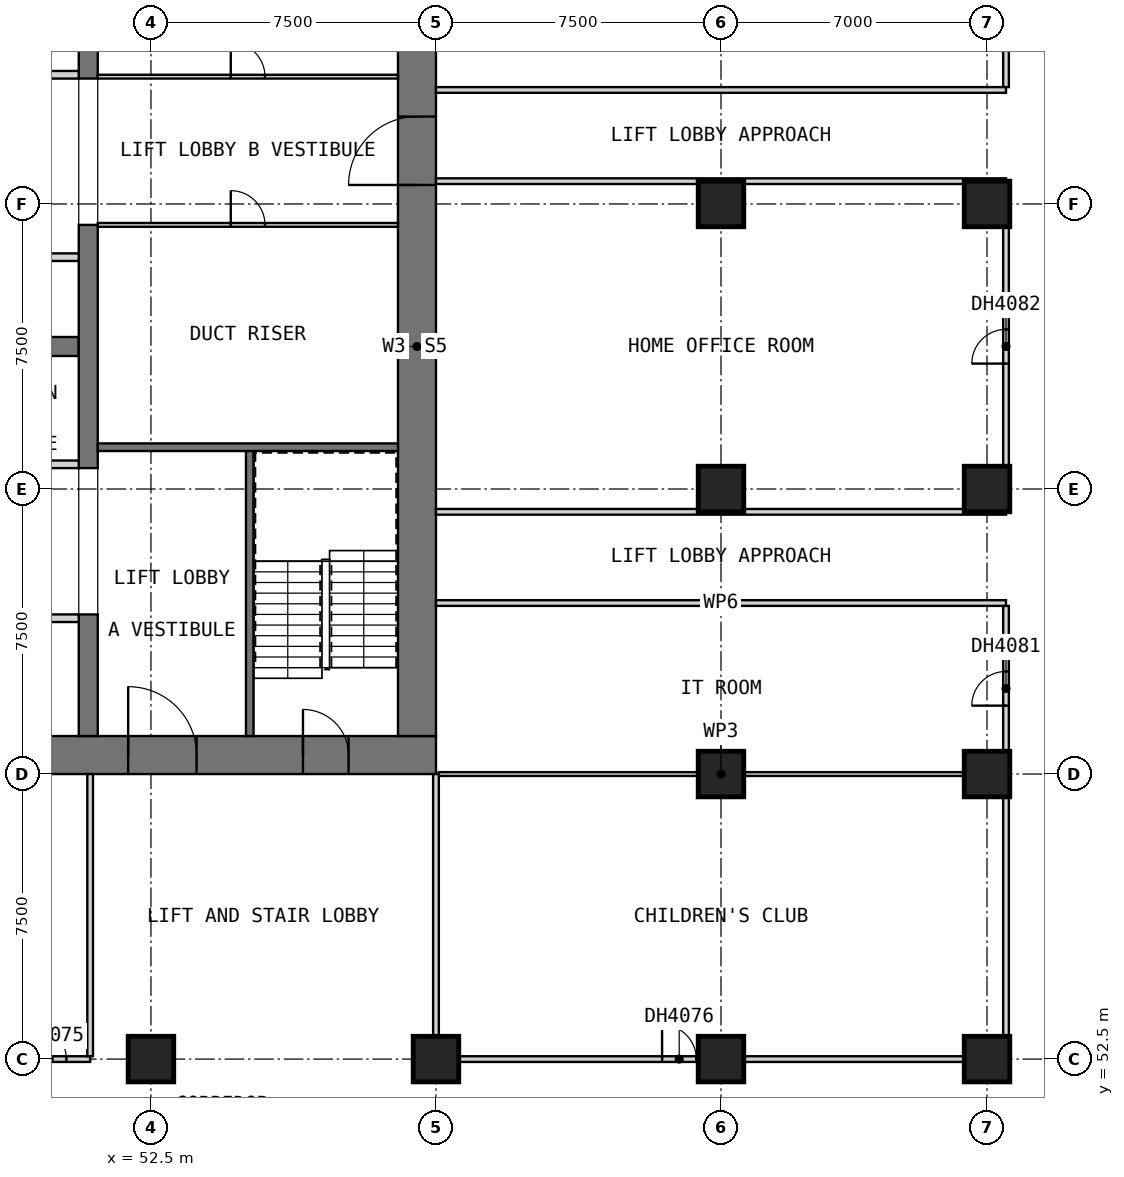
"""IFC4 building model, lengths in metres.
Left out: names, types, materials, properties, quantities, classifications, styles, units other than length and angle.
Written with IfcOpenShell. Run it as: python <this file> out.ifc"""

import sys

from ifc_helpers import new_model, si_unit, direction, frame, frame_2d, origin, origin_2d, place, context, subcontext, project, spatial, rectangle, extrude, element, fill, save


model = new_model("IFC4")
c1 = context("Model", 3, precision=1e-05, world=origin(), true_north=direction((0.0, 1.0)))
c2 = subcontext(c1, "Body", "Model", "MODEL_VIEW")
j1 = project(units=[si_unit("LENGTHUNIT", "METRE"), si_unit("PLANEANGLEUNIT", "RADIAN")], contexts=[c1])
p1 = place(None, origin())
s1 = spatial("IfcSite", under=j1, at=p1, CompositionType="ELEMENT")
p2 = place(p1, origin())
s2 = spatial("IfcBuilding", under=s1, at=p2, CompositionType="ELEMENT")
p3 = place(p2, frame((0.0, 0.0, 44.8)))
s3 = spatial("IfcBuildingStorey", under=s2, at=p3, CompositionType="ELEMENT", Elevation=44.8)
for number, where, z_axis, x_axis in (
    (1, (52.5, 52.5, 0.0), (0.0, 0.0, 1.0), (1.0, 0.0, 0.0)),
    (2, (60.0, 52.5, 0.0), (0.0, 0.0, 1.0), (1.0, 0.0, 0.0)),
    (3, (67.5, 52.5, 0.0), (0.0, 0.0, 1.0), (1.0, 0.0, 0.0)),
    (4, (67.5, 60.0, 0.0), (0.0, 0.0, 1.0), (1.0, 0.0, 0.0)),
    (5, (67.5, 67.5, 0.0), (0.0, 0.0, 1.0), (1.0, 0.0, 0.0)),
    (6, (67.5, 75.0, 0.0), (0.0, 0.0, 1.0), (1.0, 0.0, 0.0)),
    (7, (74.5, 52.5, 0.0), (0.0, 0.0, 1.0), (1.0, 0.0, 0.0)),
    (8, (74.5, 60.0, 0.0), (0.0, 0.0, 1.0), (1.0, 0.0, 0.0)),
    (9, (74.5, 67.5, 0.0), (0.0, 0.0, 1.0), (1.0, 0.0, 0.0)),
    (10, (74.5, 75.0, 0.0), (0.0, 0.0, 1.0), (1.0, 0.0, 0.0)),
):
    element("IfcColumn", number, at=place(p3, frame(where, z_axis=z_axis, x_axis=x_axis)), inside=s3, PredefinedType="COLUMN", context=c2, shape_type="SweptSolid", body=[
        extrude(rectangle(XDim=1.2, YDim=1.2, at=origin_2d()), origin(), (0.0, 0.0, 1.0), 3.6),
    ])
p4 = place(p3, frame((30.0, 60.5, 0.0), z_axis=(0.0, 0.0, 1.0), x_axis=(1.0, 0.0, 0.0)))
e11 = element("IfcWall", 11, at=p4, inside=s3, PredefinedType="SHEAR", context=c2, shape_type="SweptSolid", body=[
    extrude(rectangle(XDim=30.0, YDim=1.0, at=frame_2d((15.0, 0.0))), origin(), (0.0, 0.0, 1.0), 3.6),
])
p5 = place(p4, frame((21.9, 0.0, 0.0)))
e12 = element("IfcOpeningElement", 12, at=p5, cuts=e11, PredefinedType="OPENING", context=c2, shape_type="SweptSolid", body=[
    extrude(rectangle(XDim=1.8, YDim=2.1, at=frame_2d((0.9, 1.05))), frame((0.0, 0.51, 0.0), z_axis=(0.0, -1.0, 0.0), x_axis=(1.0, 0.0, 0.0)), (0.0, 0.0, 1.0), 1.02),
])
p6 = place(p4, frame((26.5, 0.0, 0.0)))
e13 = element("IfcOpeningElement", 13, at=p6, cuts=e11, PredefinedType="OPENING", context=c2, shape_type="SweptSolid", body=[
    extrude(rectangle(XDim=1.2, YDim=2.1, at=frame_2d((0.6, 1.05))), frame((0.0, 0.51, 0.0), z_axis=(0.0, -1.0, 0.0), x_axis=(1.0, 0.0, 0.0)), (0.0, 0.0, 1.0), 1.02),
])
p7 = place(p3, frame((59.5, 61.0, 0.0), z_axis=(0.0, 0.0, 1.0), x_axis=(0.0, 1.0, 0.0)))
e14 = element("IfcWall", 14, at=p7, inside=s3, PredefinedType="SHEAR", context=c2, shape_type="SweptSolid", body=[
    extrude(rectangle(XDim=20.5, YDim=1.0, at=frame_2d((10.25, 0.0))), origin(), (0.0, 0.0, 1.0), 3.6),
])
p8 = place(p7, frame((14.5, 0.0, 0.0)))
e15 = element("IfcOpeningElement", 15, at=p8, cuts=e14, PredefinedType="OPENING", context=c2, shape_type="SweptSolid", body=[
    extrude(rectangle(XDim=1.8, YDim=2.1, at=frame_2d((0.9, 1.05))), frame((0.0, 0.51, 0.0), z_axis=(0.0, -1.0, 0.0), x_axis=(1.0, 0.0, 0.0)), (0.0, 0.0, 1.0), 1.02),
])
p9 = place(p3, frame((35.0, 71.25, 0.0), z_axis=(0.0, 0.0, 1.0), x_axis=(1.0, 0.0, 0.0)))
e16 = element("IfcWall", 16, at=p9, inside=s3, PredefinedType="SHEAR", context=c2, shape_type="SweptSolid", body=[
    extrude(rectangle(XDim=15.6, YDim=0.5, at=frame_2d((7.8, 0.0))), origin(), (0.0, 0.0, 1.0), 3.6),
])
p10 = place(p3, frame((50.85, 61.0, 0.0), z_axis=(0.0, 0.0, 1.0), x_axis=(0.0, 1.0, 0.0)))
e17 = element("IfcWall", 17, at=p10, inside=s3, PredefinedType="SHEAR", context=c2, shape_type="SweptSolid", body=[
    extrude(rectangle(XDim=3.2, YDim=0.5, at=frame_2d((1.6, 0.0))), origin(), (0.0, 0.0, 1.0), 3.6),
])
p11 = place(p3, frame((50.85, 68.05, 0.0), z_axis=(0.0, 0.0, 1.0), x_axis=(0.0, 1.0, 0.0)))
e18 = element("IfcWall", 18, at=p11, inside=s3, PredefinedType="SHEAR", context=c2, shape_type="SweptSolid", body=[
    extrude(rectangle(XDim=6.4, YDim=0.5, at=frame_2d((3.2, 0.0))), origin(), (0.0, 0.0, 1.0), 3.6),
])
p12 = place(p3, frame((50.85, 78.3, 0.0), z_axis=(0.0, 0.0, 1.0), x_axis=(0.0, 1.0, 0.0)))
e19 = element("IfcWall", 19, at=p12, inside=s3, PredefinedType="SHEAR", context=c2, shape_type="SweptSolid", body=[
    extrude(rectangle(XDim=3.2, YDim=0.5, at=frame_2d((1.6, 0.0))), origin(), (0.0, 0.0, 1.0), 3.6),
])
p13 = place(p3, frame((48.0, 64.1, 0.0), z_axis=(0.0, 0.0, 1.0), x_axis=(1.0, 0.0, 0.0)))
e20 = element("IfcWall", 20, at=p13, inside=s3, PredefinedType="PARTITIONING", context=c2, shape_type="SweptSolid", body=[
    extrude(rectangle(XDim=2.6, YDim=0.2, at=frame_2d((1.3, 0.0))), origin(), (0.0, 0.0, 1.0), 3.35),
])
p14 = place(p13, frame((0.85, 0.0, 0.0)))
e21 = element("IfcOpeningElement", 21, at=p14, cuts=e20, PredefinedType="OPENING", context=c2, shape_type="SweptSolid", body=[
    extrude(rectangle(XDim=0.9, YDim=2.1, at=frame_2d((0.45, 1.05))), frame((0.0, 0.11, 0.0), z_axis=(0.0, -1.0, 0.0), x_axis=(1.0, 0.0, 0.0)), (0.0, 0.0, 1.0), 0.22),
])
p15 = place(p3, frame((48.0, 68.15, 0.0), z_axis=(0.0, 0.0, 1.0), x_axis=(1.0, 0.0, 0.0)))
e22 = element("IfcWall", 22, at=p15, inside=s3, PredefinedType="PARTITIONING", context=c2, shape_type="SweptSolid", body=[
    extrude(rectangle(XDim=2.6, YDim=0.2, at=frame_2d((1.3, 0.0))), origin(), (0.0, 0.0, 1.0), 3.35),
])
p16 = place(p15, frame((0.85, 0.0, 0.0)))
e23 = element("IfcOpeningElement", 23, at=p16, cuts=e22, PredefinedType="OPENING", context=c2, shape_type="SweptSolid", body=[
    extrude(rectangle(XDim=0.9, YDim=2.1, at=frame_2d((0.45, 1.05))), frame((0.0, 0.11, 0.0), z_axis=(0.0, -1.0, 0.0), x_axis=(1.0, 0.0, 0.0)), (0.0, 0.0, 1.0), 0.22),
])
p17 = place(p3, frame((35.0, 73.6, 0.0), z_axis=(0.0, 0.0, 1.0), x_axis=(1.0, 0.0, 0.0)))
e24 = element("IfcWall", 24, at=p17, inside=s3, PredefinedType="PARTITIONING", context=c2, shape_type="SweptSolid", body=[
    extrude(rectangle(XDim=15.6, YDim=0.2, at=frame_2d((7.8, 0.0))), origin(), (0.0, 0.0, 1.0), 3.35),
])
p18 = place(p17, frame((3.55, 0.0, 0.0)))
e25 = element("IfcOpeningElement", 25, at=p18, cuts=e24, PredefinedType="OPENING", context=c2, shape_type="SweptSolid", body=[
    extrude(rectangle(XDim=0.9, YDim=2.1, at=frame_2d((0.45, 1.05))), frame((0.0, 0.11, 0.0), z_axis=(0.0, -1.0, 0.0), x_axis=(1.0, 0.0, 0.0)), (0.0, 0.0, 1.0), 0.22),
])
p19 = place(p17, frame((11.35, 0.0, 0.0)))
e26 = element("IfcOpeningElement", 26, at=p19, cuts=e24, PredefinedType="OPENING", context=c2, shape_type="SweptSolid", body=[
    extrude(rectangle(XDim=0.9, YDim=2.1, at=frame_2d((0.45, 1.05))), frame((0.0, 0.11, 0.0), z_axis=(0.0, -1.0, 0.0), x_axis=(1.0, 0.0, 0.0)), (0.0, 0.0, 1.0), 0.22),
])
p20 = place(p3, frame((35.0, 78.4, 0.0), z_axis=(0.0, 0.0, 1.0), x_axis=(1.0, 0.0, 0.0)))
e27 = element("IfcWall", 27, at=p20, inside=s3, PredefinedType="SOLIDWALL", context=c2, shape_type="SweptSolid", body=[
    extrude(rectangle(XDim=15.6, YDim=0.2, at=frame_2d((7.8, 0.0))), origin(), (0.0, 0.0, 1.0), 3.6),
])
p21 = place(p20, frame((0.75, 0.0, 0.0)))
e28 = element("IfcOpeningElement", 28, at=p21, cuts=e27, PredefinedType="OPENING", context=c2, shape_type="SweptSolid", body=[
    extrude(rectangle(XDim=1.1, YDim=2.1, at=frame_2d((0.55, 1.05))), frame((0.0, 0.11, 0.0), z_axis=(0.0, -1.0, 0.0), x_axis=(1.0, 0.0, 0.0)), (0.0, 0.0, 1.0), 0.22),
])
p22 = place(p20, frame((3.35, 0.0, 0.0)))
e29 = element("IfcOpeningElement", 29, at=p22, cuts=e27, PredefinedType="OPENING", context=c2, shape_type="SweptSolid", body=[
    extrude(rectangle(XDim=1.1, YDim=2.1, at=frame_2d((0.55, 1.05))), frame((0.0, 0.11, 0.0), z_axis=(0.0, -1.0, 0.0), x_axis=(1.0, 0.0, 0.0)), (0.0, 0.0, 1.0), 0.22),
])
p23 = place(p20, frame((11.15, 0.0, 0.0)))
e30 = element("IfcOpeningElement", 30, at=p23, cuts=e27, PredefinedType="OPENING", context=c2, shape_type="SweptSolid", body=[
    extrude(rectangle(XDim=1.1, YDim=2.1, at=frame_2d((0.55, 1.05))), frame((0.0, 0.11, 0.0), z_axis=(0.0, -1.0, 0.0), x_axis=(1.0, 0.0, 0.0)), (0.0, 0.0, 1.0), 0.22),
])
p24 = place(p20, frame((13.75, 0.0, 0.0)))
e31 = element("IfcOpeningElement", 31, at=p24, cuts=e27, PredefinedType="OPENING", context=c2, shape_type="SweptSolid", body=[
    extrude(rectangle(XDim=1.1, YDim=2.1, at=frame_2d((0.55, 1.05))), frame((0.0, 0.11, 0.0), z_axis=(0.0, -1.0, 0.0), x_axis=(1.0, 0.0, 0.0)), (0.0, 0.0, 1.0), 0.22),
])
p25 = place(p3, frame((55.1, 61.0, 0.0), z_axis=(0.0, 0.0, 1.0), x_axis=(0.0, 1.0, 0.0)))
e32 = element("IfcWall", 32, at=p25, inside=s3, PredefinedType="SOLIDWALL", context=c2, shape_type="SweptSolid", body=[
    extrude(rectangle(XDim=7.6, YDim=0.2, at=frame_2d((3.8, 0.0))), origin(), (0.0, 0.0, 1.0), 3.35),
])
p26 = place(p3, frame((51.1, 68.6, 0.0), z_axis=(0.0, 0.0, 1.0), x_axis=(1.0, 0.0, 0.0)))
e33 = element("IfcWall", 33, at=p26, inside=s3, PredefinedType="SOLIDWALL", context=c2, shape_type="SweptSolid", body=[
    extrude(rectangle(XDim=7.9, YDim=0.2, at=frame_2d((3.95, 0.0))), origin(), (0.0, 0.0, 1.0), 3.35),
])
p27 = place(p3, frame((51.1, 74.45, 0.0), z_axis=(0.0, 0.0, 1.0), x_axis=(1.0, 0.0, 0.0)))
e34 = element("IfcWall", 34, at=p27, inside=s3, PredefinedType="PARTITIONING", context=c2, shape_type="SweptSolid", body=[
    extrude(rectangle(XDim=7.9, YDim=0.1, at=frame_2d((3.95, 0.0))), origin(), (0.0, 0.0, 1.0), 3.35),
])
p28 = place(p27, frame((3.5, 0.0, 0.0)))
e35 = element("IfcOpeningElement", 35, at=p28, cuts=e34, PredefinedType="OPENING", context=c2, shape_type="SweptSolid", body=[
    extrude(rectangle(XDim=0.9, YDim=2.1, at=frame_2d((0.45, 1.05))), frame((0.0, 0.06, 0.0), z_axis=(0.0, -1.0, 0.0), x_axis=(1.0, 0.0, 0.0)), (0.0, 0.0, 1.0), 0.12),
])
p29 = place(p3, frame((51.1, 78.35, 0.0), z_axis=(0.0, 0.0, 1.0), x_axis=(1.0, 0.0, 0.0)))
e36 = element("IfcWall", 36, at=p29, inside=s3, PredefinedType="PARTITIONING", context=c2, shape_type="SweptSolid", body=[
    extrude(rectangle(XDim=7.9, YDim=0.1, at=frame_2d((3.95, 0.0))), origin(), (0.0, 0.0, 1.0), 3.35),
])
p30 = place(p29, frame((3.5, 0.0, 0.0)))
e37 = element("IfcOpeningElement", 37, at=p30, cuts=e36, PredefinedType="OPENING", context=c2, shape_type="SweptSolid", body=[
    extrude(rectangle(XDim=0.9, YDim=2.1, at=frame_2d((0.45, 1.05))), frame((0.0, 0.06, 0.0), z_axis=(0.0, -1.0, 0.0), x_axis=(1.0, 0.0, 0.0)), (0.0, 0.0, 1.0), 0.12),
])
p31 = place(p3, frame((33.75, 52.5, 0.0), z_axis=(0.0, 0.0, 1.0), x_axis=(1.0, 0.0, 0.0)))
e38 = element("IfcWall", 38, at=p31, inside=s3, PredefinedType="PARTITIONING", context=c2, shape_type="SweptSolid", body=[
    extrude(rectangle(XDim=17.15, YDim=0.15, at=frame_2d((8.575, 0.0))), origin(), (0.0, 0.0, 1.0), 3.35),
])
p32 = place(p31, frame((4.425, 0.0, 0.0)))
e39 = element("IfcOpeningElement", 39, at=p32, cuts=e38, PredefinedType="OPENING", context=c2, shape_type="SweptSolid", body=[
    extrude(rectangle(XDim=0.9, YDim=2.1, at=frame_2d((0.45, 1.05))), frame((0.0, 0.085, 0.0), z_axis=(0.0, -1.0, 0.0), x_axis=(1.0, 0.0, 0.0)), (0.0, 0.0, 1.0), 0.17),
])
p33 = place(p31, frame((9.15, 0.0, 0.0)))
e40 = element("IfcOpeningElement", 40, at=p33, cuts=e38, PredefinedType="OPENING", context=c2, shape_type="SweptSolid", body=[
    extrude(rectangle(XDim=0.9, YDim=2.1, at=frame_2d((0.45, 1.05))), frame((0.0, 0.085, 0.0), z_axis=(0.0, -1.0, 0.0), x_axis=(1.0, 0.0, 0.0)), (0.0, 0.0, 1.0), 0.17),
])
p34 = place(p31, frame((12.675, 0.0, 0.0)))
e41 = element("IfcOpeningElement", 41, at=p34, cuts=e38, PredefinedType="OPENING", context=c2, shape_type="SweptSolid", body=[
    extrude(rectangle(XDim=0.9, YDim=2.1, at=frame_2d((0.45, 1.05))), frame((0.0, 0.085, 0.0), z_axis=(0.0, -1.0, 0.0), x_axis=(1.0, 0.0, 0.0)), (0.0, 0.0, 1.0), 0.17),
])
p35 = place(p31, frame((15.625, 0.0, 0.0)))
e42 = element("IfcOpeningElement", 42, at=p35, cuts=e38, PredefinedType="OPENING", context=c2, shape_type="SweptSolid", body=[
    extrude(rectangle(XDim=0.9, YDim=2.1, at=frame_2d((0.45, 1.05))), frame((0.0, 0.085, 0.0), z_axis=(0.0, -1.0, 0.0), x_axis=(1.0, 0.0, 0.0)), (0.0, 0.0, 1.0), 0.17),
])
p36 = place(p3, frame((60.0, 52.5, 0.0), z_axis=(0.0, 0.0, 1.0), x_axis=(1.0, 0.0, 0.0)))
e43 = element("IfcWall", 43, at=p36, inside=s3, PredefinedType="PARTITIONING", context=c2, shape_type="SweptSolid", body=[
    extrude(rectangle(XDim=15.0, YDim=0.15, at=frame_2d((7.5, 0.0))), origin(), (0.0, 0.0, 1.0), 3.35),
])
p37 = place(p36, frame((5.95, 0.0, 0.0)))
e44 = element("IfcOpeningElement", 44, at=p37, cuts=e43, PredefinedType="OPENING", context=c2, shape_type="SweptSolid", body=[
    extrude(rectangle(XDim=0.9, YDim=2.1, at=frame_2d((0.45, 1.05))), frame((0.0, 0.085, 0.0), z_axis=(0.0, -1.0, 0.0), x_axis=(1.0, 0.0, 0.0)), (0.0, 0.0, 1.0), 0.17),
])
p38 = place(p3, frame((75.0, 52.575, 0.0), z_axis=(0.0, 0.0, 1.0), x_axis=(0.0, 1.0, 0.0)))
e45 = element("IfcWall", 45, at=p38, inside=s3, PredefinedType="PARTITIONING", context=c2, shape_type="SweptSolid", body=[
    extrude(rectangle(XDim=11.85, YDim=0.15, at=frame_2d((5.925, 0.0))), origin(), (0.0, 0.0, 1.0), 3.35),
])
p39 = place(p38, frame((9.225, 0.0, 0.0)))
e46 = element("IfcOpeningElement", 46, at=p39, cuts=e45, PredefinedType="OPENING", context=c2, shape_type="SweptSolid", body=[
    extrude(rectangle(XDim=0.9, YDim=2.1, at=frame_2d((0.45, 1.05))), frame((0.0, 0.085, 0.0), z_axis=(0.0, -1.0, 0.0), x_axis=(1.0, 0.0, 0.0)), (0.0, 0.0, 1.0), 0.17),
])
p40 = place(p3, frame((75.0, 66.975, 0.0), z_axis=(0.0, 0.0, 1.0), x_axis=(0.0, 1.0, 0.0)))
e47 = element("IfcWall", 47, at=p40, inside=s3, PredefinedType="PARTITIONING", context=c2, shape_type="SweptSolid", body=[
    extrude(rectangle(XDim=8.55, YDim=0.15, at=frame_2d((4.275, 0.0))), origin(), (0.0, 0.0, 1.0), 3.35),
])
p41 = place(p40, frame((3.825, 0.0, 0.0)))
e48 = element("IfcOpeningElement", 48, at=p41, cuts=e47, PredefinedType="OPENING", context=c2, shape_type="SweptSolid", body=[
    extrude(rectangle(XDim=0.9, YDim=2.1, at=frame_2d((0.45, 1.05))), frame((0.0, 0.085, 0.0), z_axis=(0.0, -1.0, 0.0), x_axis=(1.0, 0.0, 0.0)), (0.0, 0.0, 1.0), 0.17),
])
p42 = place(p3, frame((75.0, 78.075, 0.0), z_axis=(0.0, 0.0, 1.0), x_axis=(0.0, 1.0, 0.0)))
e49 = element("IfcWall", 49, at=p42, inside=s3, PredefinedType="PARTITIONING", context=c2, shape_type="SweptSolid", body=[
    extrude(rectangle(XDim=11.85, YDim=0.15, at=frame_2d((5.925, 0.0))), origin(), (0.0, 0.0, 1.0), 3.35),
])
p43 = place(p42, frame((7.725, 0.0, 0.0)))
e50 = element("IfcOpeningElement", 50, at=p43, cuts=e49, PredefinedType="OPENING", context=c2, shape_type="SweptSolid", body=[
    extrude(rectangle(XDim=0.9, YDim=2.1, at=frame_2d((0.45, 1.05))), frame((0.0, 0.085, 0.0), z_axis=(0.0, -1.0, 0.0), x_axis=(1.0, 0.0, 0.0)), (0.0, 0.0, 1.0), 0.17),
])
p44 = place(p42, frame((1.725, 0.0, 0.0)))
e51 = element("IfcOpeningElement", 51, at=p44, cuts=e49, PredefinedType="OPENING", context=c2, shape_type="SweptSolid", body=[
    extrude(rectangle(XDim=0.9, YDim=2.1, at=frame_2d((0.45, 1.05))), frame((0.0, 0.085, 0.0), z_axis=(0.0, -1.0, 0.0), x_axis=(1.0, 0.0, 0.0)), (0.0, 0.0, 1.0), 0.17),
])
p45 = place(p3, frame((60.075, 60.0, 0.0), z_axis=(0.0, 0.0, 1.0), x_axis=(1.0, 0.0, 0.0)))
e52 = element("IfcWall", 52, at=p45, inside=s3, PredefinedType="PARTITIONING", context=c2, shape_type="SweptSolid", body=[
    extrude(rectangle(XDim=14.85, YDim=0.1, at=frame_2d((7.425, 0.0))), origin(), (0.0, 0.0, 1.0), 3.35),
])
for number, where, z_axis, x_axis in (
    (53, (60.0, 64.5, 0.0), (0.0, 0.0, 1.0), (1.0, 0.0, 0.0)),
    (54, (60.0, 66.9, 0.0), (0.0, 0.0, 1.0), (1.0, 0.0, 0.0)),
    (55, (60.0, 75.6, 0.0), (0.0, 0.0, 1.0), (1.0, 0.0, 0.0)),
    (56, (60.0, 78.0, 0.0), (0.0, 0.0, 1.0), (1.0, 0.0, 0.0)),
):
    element("IfcWall", number, at=place(p3, frame(where, z_axis=z_axis, x_axis=x_axis)), inside=s3, PredefinedType="PARTITIONING", context=c2, shape_type="SweptSolid", body=[
        extrude(rectangle(XDim=15.0, YDim=0.15, at=frame_2d((7.5, 0.0))), origin(), (0.0, 0.0, 1.0), 3.35),
    ])
for number, where, z_axis, x_axis in (
    (57, (50.9, 52.575, 0.0), (0.0, 0.0, 1.0), (0.0, 1.0, 0.0)),
    (58, (60.0, 52.575, 0.0), (0.0, 0.0, 1.0), (0.0, 1.0, 0.0)),
):
    element("IfcWall", number, at=place(p3, frame(where, z_axis=z_axis, x_axis=x_axis)), inside=s3, PredefinedType="PARTITIONING", context=c2, shape_type="SweptSolid", body=[
        extrude(rectangle(XDim=7.425, YDim=0.15, at=frame_2d((3.712, 0.0))), origin(), (0.0, 0.0, 1.0), 3.35),
    ])
p46 = place(p5, origin())
e59 = element("IfcDoor", 59, at=p46, inside=s3, OperationType="DOUBLE_DOOR_SINGLE_SWING", PredefinedType="DOOR", context=c2, shape_type="SweptSolid", body=[
    extrude(rectangle(XDim=1.8, YDim=2.1, at=frame_2d((0.9, 1.05))), frame((0.0, 0.025, 0.0), z_axis=(0.0, -1.0, 0.0), x_axis=(1.0, 0.0, 0.0)), (0.0, 0.0, 1.0), 0.05),
])
fill(e12, e59)
p47 = place(p8, origin())
e60 = element("IfcDoor", 60, at=p47, inside=s3, OperationType="DOUBLE_DOOR_SINGLE_SWING", PredefinedType="DOOR", context=c2, shape_type="SweptSolid", body=[
    extrude(rectangle(XDim=1.8, YDim=2.1, at=frame_2d((0.9, 1.05))), frame((0.0, 0.025, 0.0), z_axis=(0.0, -1.0, 0.0), x_axis=(1.0, 0.0, 0.0)), (0.0, 0.0, 1.0), 0.05),
])
fill(e15, e60)
p48 = place(p6, origin())
e61 = element("IfcDoor", 61, at=p48, inside=s3, OperationType="SINGLE_SWING_LEFT", PredefinedType="DOOR", context=c2, shape_type="SweptSolid", body=[
    extrude(rectangle(XDim=1.2, YDim=2.1, at=frame_2d((0.6, 1.05))), frame((0.0, 0.025, 0.0), z_axis=(0.0, -1.0, 0.0), x_axis=(1.0, 0.0, 0.0)), (0.0, 0.0, 1.0), 0.05),
])
fill(e13, e61)
p49 = place(p28, origin())
e62 = element("IfcDoor", 62, at=p49, inside=s3, OperationType="SINGLE_SWING_LEFT", PredefinedType="DOOR", context=c2, shape_type="SweptSolid", body=[
    extrude(rectangle(XDim=0.9, YDim=2.1, at=frame_2d((0.45, 1.05))), frame((0.0, 0.025, 0.0), z_axis=(0.0, -1.0, 0.0), x_axis=(1.0, 0.0, 0.0)), (0.0, 0.0, 1.0), 0.05),
])
fill(e35, e62)
p50 = place(p30, origin())
e63 = element("IfcDoor", 63, at=p50, inside=s3, OperationType="SINGLE_SWING_LEFT", PredefinedType="DOOR", context=c2, shape_type="SweptSolid", body=[
    extrude(rectangle(XDim=0.9, YDim=2.1, at=frame_2d((0.45, 1.05))), frame((0.0, 0.025, 0.0), z_axis=(0.0, -1.0, 0.0), x_axis=(1.0, 0.0, 0.0)), (0.0, 0.0, 1.0), 0.05),
])
fill(e37, e63)
p51 = place(p35, origin())
e64 = element("IfcDoor", 64, at=p51, inside=s3, OperationType="SINGLE_SWING_LEFT", PredefinedType="DOOR", context=c2, shape_type="SweptSolid", body=[
    extrude(rectangle(XDim=0.9, YDim=2.1, at=frame_2d((0.45, 1.05))), frame((0.0, 0.025, 0.0), z_axis=(0.0, -1.0, 0.0), x_axis=(1.0, 0.0, 0.0)), (0.0, 0.0, 1.0), 0.05),
])
fill(e42, e64)
p52 = place(p37, origin())
e65 = element("IfcDoor", 65, at=p52, inside=s3, OperationType="SINGLE_SWING_LEFT", PredefinedType="DOOR", context=c2, shape_type="SweptSolid", body=[
    extrude(rectangle(XDim=0.9, YDim=2.1, at=frame_2d((0.45, 1.05))), frame((0.0, 0.025, 0.0), z_axis=(0.0, -1.0, 0.0), x_axis=(1.0, 0.0, 0.0)), (0.0, 0.0, 1.0), 0.05),
])
fill(e44, e65)
p53 = place(p39, origin())
e66 = element("IfcDoor", 66, at=p53, inside=s3, OperationType="SINGLE_SWING_LEFT", PredefinedType="DOOR", context=c2, shape_type="SweptSolid", body=[
    extrude(rectangle(XDim=0.9, YDim=2.1, at=frame_2d((0.45, 1.05))), frame((0.0, 0.025, 0.0), z_axis=(0.0, -1.0, 0.0), x_axis=(1.0, 0.0, 0.0)), (0.0, 0.0, 1.0), 0.05),
])
fill(e46, e66)
p54 = place(p41, origin())
e67 = element("IfcDoor", 67, at=p54, inside=s3, OperationType="SINGLE_SWING_LEFT", PredefinedType="DOOR", context=c2, shape_type="SweptSolid", body=[
    extrude(rectangle(XDim=0.9, YDim=2.1, at=frame_2d((0.45, 1.05))), frame((0.0, 0.025, 0.0), z_axis=(0.0, -1.0, 0.0), x_axis=(1.0, 0.0, 0.0)), (0.0, 0.0, 1.0), 0.05),
])
fill(e48, e67)
save(model, sys.argv[1])
